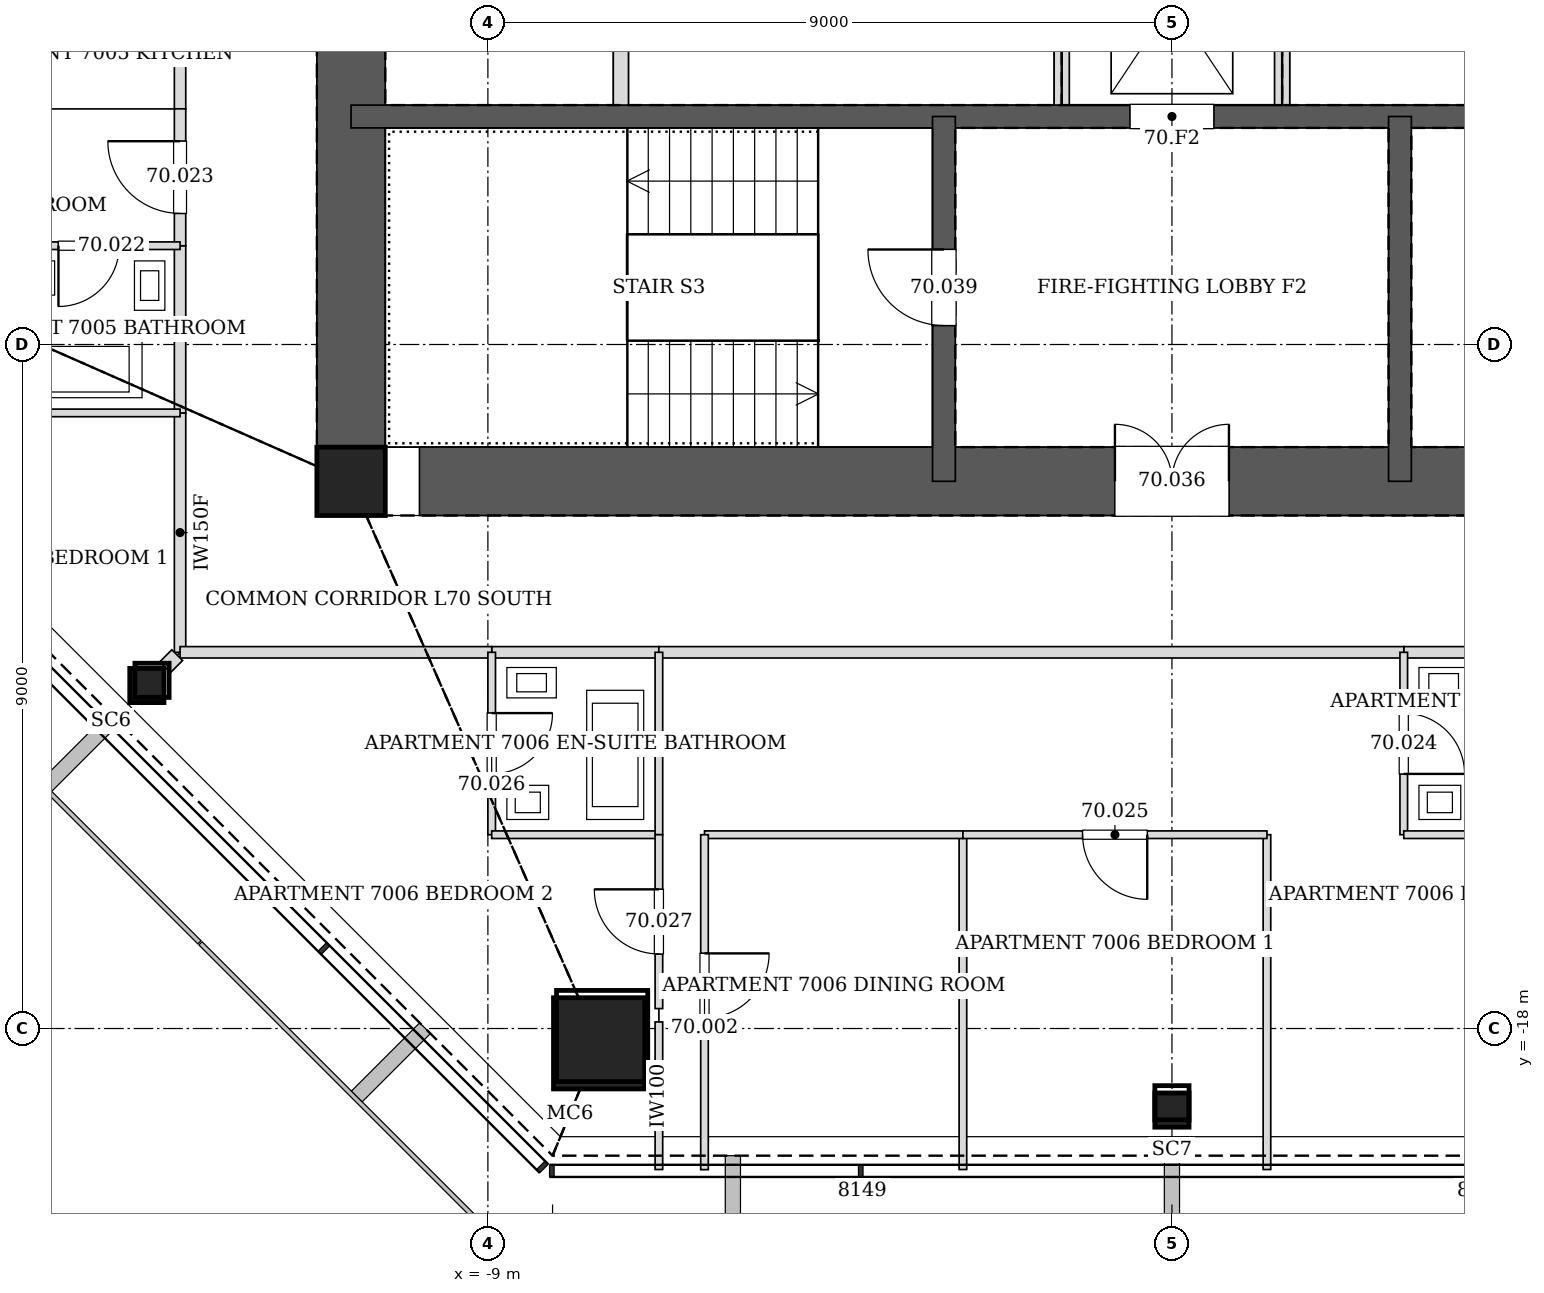
"""IFC4 building model, lengths in metres.
Left out: names, types, materials, properties, quantities, classifications, styles, units other than length and angle.
Written with IfcOpenShell. Run it as: python <this file> out.ifc"""

import sys

from ifc_helpers import new_model, si_unit, direction, frame, frame_2d, origin, origin_2d, place, context, subcontext, project, spatial, rectangle, hollow_rectangle, extrude, element, fill, save


model = new_model("IFC4")
c1 = context("Model", 3, precision=1e-05, world=origin(), true_north=direction((0.0, 1.0)))
c2 = subcontext(c1, "Body", "Model", "MODEL_VIEW")
j1 = project(units=[si_unit("LENGTHUNIT", "METRE"), si_unit("PLANEANGLEUNIT", "RADIAN")], contexts=[c1])
p1 = place(None, origin())
s1 = spatial("IfcSite", under=j1, at=p1, CompositionType="ELEMENT")
p2 = place(p1, origin())
s2 = spatial("IfcBuilding", under=s1, at=p2, CompositionType="ELEMENT")
p3 = place(p2, frame((0.0, 0.0, 287.8)))
s3 = spatial("IfcBuildingStorey", under=s2, at=p3, CompositionType="ELEMENT", Elevation=287.8)
p4 = place(p3, frame((-7.537, -18.195, 0.0), z_axis=(0.01169924247, 0.02827915051, 0.999531598986), x_axis=(-0.924045401938, 0.382282742426, 0.0)))
e1 = element("IfcColumn", 1, at=p4, inside=s3, PredefinedType="COLUMN", context=c2, shape_type="SweptSolid", body=[
    extrude(hollow_rectangle(XDim=1.2, YDim=1.2, WallThickness=0.055, at=origin_2d()), origin(), (0.0, 0.0, 1.0), 3.402),
])
for number, where, z_axis, x_axis in (
    (2, (-13.487, -13.487, 0.0), (0.02, 0.02, 1.0), (-0.707, 0.707, 0.0)),
    (3, (0.0, -19.073, 0.0), (0.0, 0.028, 1.0), (-1.0, 0.0, 0.0)),
):
    element("IfcColumn", number, at=place(p3, frame(where, z_axis=z_axis, x_axis=x_axis)), inside=s3, PredefinedType="COLUMN", context=c2, shape_type="SweptSolid", body=[
        extrude(hollow_rectangle(XDim=0.45, YDim=0.45, WallThickness=0.02, at=origin_2d()), origin(), (0.0, 0.0, 1.0), 3.401),
    ])
p5 = place(p3, frame((-10.8, -10.8, 0.0), z_axis=(0.0, 0.0, 1.0), x_axis=(1.0, 0.0, 0.0)))
e4 = element("IfcColumn", 4, at=p5, inside=s3, PredefinedType="COLUMN", context=c2, shape_type="SweptSolid", body=[
    extrude(hollow_rectangle(XDim=0.9, YDim=0.9, WallThickness=0.04, at=origin_2d()), origin(), (0.0, 0.0, 1.0), 3.4),
])
p6 = place(p3, frame((-10.8, -10.8, 0.0), z_axis=(0.0, 0.0, 1.0), x_axis=(1.0, 0.0, 0.0)))
e5 = element("IfcWall", 5, at=p6, inside=s3, PredefinedType="SOLIDWALL", context=c2, shape_type="SweptSolid", body=[
    extrude(rectangle(XDim=21.6, YDim=0.9, at=frame_2d((10.8, 0.0))), origin(), (0.0, 0.0, 1.0), 3.4),
])
p7 = place(p6, frame((10.05, 0.0, 0.0)))
e6 = element("IfcOpeningElement", 6, at=p7, cuts=e5, PredefinedType="OPENING", context=c2, shape_type="SweptSolid", body=[
    extrude(rectangle(XDim=1.5, YDim=2.1, at=frame_2d((0.75, 1.05))), frame((0.0, 0.46, 0.0), z_axis=(0.0, -1.0, 0.0), x_axis=(1.0, 0.0, 0.0)), (0.0, 0.0, 1.0), 0.92),
])
p8 = place(p6, frame((17.1, 0.0, 0.0)))
e7 = element("IfcOpeningElement", 7, at=p8, cuts=e5, PredefinedType="OPENING", context=c2, shape_type="SweptSolid", body=[
    extrude(rectangle(XDim=0.9, YDim=2.1, at=frame_2d((0.45, 1.05))), frame((0.0, 0.46, 0.0), z_axis=(0.0, -1.0, 0.0), x_axis=(1.0, 0.0, 0.0)), (0.0, 0.0, 1.0), 0.92),
])
p9 = place(p3, frame((-10.8, 10.8, 0.0), z_axis=(0.0, 0.0, 1.0), x_axis=(0.0, -1.0, 0.0)))
e8 = element("IfcWall", 8, at=p9, inside=s3, PredefinedType="SOLIDWALL", context=c2, shape_type="SweptSolid", body=[
    extrude(rectangle(XDim=21.6, YDim=0.9, at=frame_2d((10.8, 0.0))), origin(), (0.0, 0.0, 1.0), 3.4),
])
p10 = place(p9, frame((8.7, 0.0, 0.0)))
e9 = element("IfcOpeningElement", 9, at=p10, cuts=e8, PredefinedType="OPENING", context=c2, shape_type="SweptSolid", body=[
    extrude(rectangle(XDim=1.2, YDim=2.1, at=frame_2d((0.6, 1.05))), frame((0.0, 0.46, 0.0), z_axis=(0.0, -1.0, 0.0), x_axis=(1.0, 0.0, 0.0)), (0.0, 0.0, 1.0), 0.92),
])
p11 = place(p9, frame((11.7, 0.0, 0.0)))
e10 = element("IfcOpeningElement", 10, at=p11, cuts=e8, PredefinedType="OPENING", context=c2, shape_type="SweptSolid", body=[
    extrude(rectangle(XDim=1.2, YDim=2.1, at=frame_2d((0.6, 1.05))), frame((0.0, 0.46, 0.0), z_axis=(0.0, -1.0, 0.0), x_axis=(1.0, 0.0, 0.0)), (0.0, 0.0, 1.0), 0.92),
])
p12 = place(p3, frame((-10.8, -6.0, 0.0), z_axis=(0.0, 0.0, 1.0), x_axis=(1.0, 0.0, 0.0)))
e11 = element("IfcWall", 11, at=p12, inside=s3, PredefinedType="SOLIDWALL", context=c2, shape_type="SweptSolid", body=[
    extrude(rectangle(XDim=21.6, YDim=0.3, at=frame_2d((10.8, 0.0))), origin(), (0.0, 0.0, 1.0), 3.4),
])
p13 = place(p12, frame((10.25, 0.0, 0.0)))
e12 = element("IfcOpeningElement", 12, at=p13, cuts=e11, PredefinedType="OPENING", context=c2, shape_type="SweptSolid", body=[
    extrude(rectangle(XDim=1.1, YDim=2.1, at=frame_2d((0.55, 1.05))), frame((0.0, 0.16, 0.0), z_axis=(0.0, -1.0, 0.0), x_axis=(1.0, 0.0, 0.0)), (0.0, 0.0, 1.0), 0.32),
])
p14 = place(p3, frame((-3.0, -6.0, 0.0), z_axis=(0.0, 0.0, 1.0), x_axis=(0.0, -1.0, 0.0)))
e13 = element("IfcWall", 13, at=p14, inside=s3, PredefinedType="SOLIDWALL", context=c2, shape_type="SweptSolid", body=[
    extrude(rectangle(XDim=4.8, YDim=0.3, at=frame_2d((2.4, 0.0))), origin(), (0.0, 0.0, 1.0), 3.4),
])
p15 = place(p14, frame((1.75, 0.0, 0.0)))
e14 = element("IfcOpeningElement", 14, at=p15, cuts=e13, PredefinedType="OPENING", context=c2, shape_type="SweptSolid", body=[
    extrude(rectangle(XDim=1.0, YDim=2.1, at=frame_2d((0.5, 1.05))), frame((0.0, 0.16, 0.0), z_axis=(0.0, -1.0, 0.0), x_axis=(1.0, 0.0, 0.0)), (0.0, 0.0, 1.0), 0.32),
])
p16 = place(p3, frame((3.0, -6.0, 0.0), z_axis=(0.0, 0.0, 1.0), x_axis=(0.0, -1.0, 0.0)))
e15 = element("IfcWall", 15, at=p16, inside=s3, PredefinedType="SOLIDWALL", context=c2, shape_type="SweptSolid", body=[
    extrude(rectangle(XDim=4.8, YDim=0.3, at=frame_2d((2.4, 0.0))), origin(), (0.0, 0.0, 1.0), 3.4),
])
p17 = place(p3, frame((-13.05, -9.899, 0.0), z_axis=(0.0, 0.0, 1.0), x_axis=(0.0, -1.0, 0.0)))
e16 = element("IfcWall", 16, at=p17, inside=s3, PredefinedType="PARTITIONING", context=c2, shape_type="SweptSolid", body=[
    extrude(rectangle(XDim=3.151, YDim=0.15, at=frame_2d((1.576, 0.0))), origin(), (0.0, 0.0, 1.0), 2.497),
])
p18 = place(p3, frame((-13.05, -7.699, 0.0), z_axis=(0.0, 0.0, 1.0), x_axis=(0.0, -1.0, 0.0)))
e17 = element("IfcWall", 17, at=p18, inside=s3, PredefinedType="PARTITIONING", context=c2, shape_type="SweptSolid", body=[
    extrude(rectangle(XDim=2.202, YDim=0.15, at=frame_2d((1.101, 0.0))), origin(), (0.0, 0.0, 1.0), 2.497),
])
p19 = place(p3, frame((-13.05, -4.449, 0.0), z_axis=(0.0, 0.0, 1.0), x_axis=(0.0, -1.0, 0.0)))
e18 = element("IfcWall", 18, at=p19, inside=s3, PredefinedType="PARTITIONING", context=c2, shape_type="SweptSolid", body=[
    extrude(rectangle(XDim=1.452, YDim=0.15, at=frame_2d((0.726, 0.0))), origin(), (0.0, 0.0, 1.0), 3.2),
])
p20 = place(p3, frame((-13.05, -5.899, 0.0), z_axis=(0.0, 0.0, 1.0), x_axis=(0.0, -1.0, 0.0)))
e19 = element("IfcWall", 19, at=p20, inside=s3, PredefinedType="PARTITIONING", context=c2, shape_type="SweptSolid", body=[
    extrude(rectangle(XDim=1.802, YDim=0.15, at=frame_2d((0.901, 0.0))), origin(), (0.0, 0.0, 1.0), 3.2),
])
p21 = place(p20, frame((0.426, 0.0, 0.0)))
e20 = element("IfcOpeningElement", 20, at=p21, cuts=e19, PredefinedType="OPENING", context=c2, shape_type="SweptSolid", body=[
    extrude(rectangle(XDim=0.95, YDim=2.1, at=frame_2d((0.475, 1.05))), frame((0.0, 0.085, 0.0), z_axis=(0.0, -1.0, 0.0), x_axis=(1.0, 0.0, 0.0)), (0.0, 0.0, 1.0), 0.17),
])
for number, where, z_axis, x_axis in (
    (21, (3.049, -13.05, 0.0), (0.0, 0.0, 1.0), (1.0, 0.0, 0.0)),
    (22, (-8.951, -13.05, 0.0), (0.0, 0.0, 1.0), (1.0, 0.0, 0.0)),
):
    element("IfcWall", number, at=place(p3, frame(where, z_axis=z_axis, x_axis=x_axis)), inside=s3, PredefinedType="PARTITIONING", context=c2, shape_type="SweptSolid", body=[
        extrude(rectangle(XDim=2.202, YDim=0.15, at=frame_2d((1.101, 0.0))), origin(), (0.0, 0.0, 1.0), 3.2),
    ])
p22 = place(p3, frame((-13.05, -13.05, 0.0), z_axis=(0.0, 0.0, 1.0), x_axis=(1.0, 0.0, 0.0)))
e23 = element("IfcWall", 23, at=p22, inside=s3, PredefinedType="PARTITIONING", context=c2, shape_type="SweptSolid", body=[
    extrude(rectangle(XDim=4.101, YDim=0.15, at=frame_2d((2.051, 0.0))), origin(), (0.0, 0.0, 1.0), 2.497),
])
p23 = place(p3, frame((-6.751, -13.05, 0.0), z_axis=(0.0, 0.0, 1.0), x_axis=(1.0, 0.0, 0.0)))
e24 = element("IfcWall", 24, at=p23, inside=s3, PredefinedType="PARTITIONING", context=c2, shape_type="SweptSolid", body=[
    extrude(rectangle(XDim=9.802, YDim=0.15, at=frame_2d((4.901, 0.0))), origin(), (0.0, 0.0, 1.0), 2.349),
])
p24 = place(p3, frame((-2.75, -19.855, 0.0), z_axis=(0.0, 0.0, 1.0), x_axis=(0.0, 1.0, 0.0)))
e25 = element("IfcWall", 25, at=p24, inside=s3, PredefinedType="PARTITIONING", context=c2, shape_type="SweptSolid", body=[
    extrude(rectangle(XDim=4.405, YDim=0.1, at=frame_2d((2.203, 0.0))), origin(), (0.0, 0.0, 1.0), 2.73),
])
p25 = place(p3, frame((-2.75, -15.45, 0.0), z_axis=(0.0, 0.0, 1.0), x_axis=(-1.0, 0.0, 0.0)))
e26 = element("IfcWall", 26, at=p25, inside=s3, PredefinedType="PARTITIONING", context=c2, shape_type="SweptSolid", body=[
    extrude(rectangle(XDim=3.4, YDim=0.1, at=frame_2d((1.7, 0.0))), origin(), (0.0, 0.0, 1.0), 3.2),
])
p26 = place(p3, frame((-6.15, -15.45, 0.0), z_axis=(0.0, 0.0, 1.0), x_axis=(0.0, -1.0, 0.0)))
e27 = element("IfcWall", 27, at=p26, inside=s3, PredefinedType="PARTITIONING", context=c2, shape_type="SweptSolid", body=[
    extrude(rectangle(XDim=4.407, YDim=0.1, at=frame_2d((2.204, 0.0))), origin(), (0.0, 0.0, 1.0), 2.73),
])
p27 = place(p26, frame((1.562, 0.0, 0.0)))
e28 = element("IfcOpeningElement", 28, at=p27, cuts=e27, PredefinedType="OPENING", context=c2, shape_type="SweptSolid", body=[
    extrude(rectangle(XDim=0.85, YDim=2.1, at=frame_2d((0.425, 1.05))), frame((0.0, 0.06, 0.0), z_axis=(0.0, -1.0, 0.0), x_axis=(1.0, 0.0, 0.0)), (0.0, 0.0, 1.0), 0.12),
])
p28 = place(p3, frame((-13.05, -9.9, 0.0), z_axis=(0.0, 0.0, 1.0), x_axis=(-1.0, 0.0, 0.0)))
e29 = element("IfcWall", 29, at=p28, inside=s3, PredefinedType="PARTITIONING", context=c2, shape_type="SweptSolid", body=[
    extrude(rectangle(XDim=2.401, YDim=0.1, at=frame_2d((1.2, 0.0))), origin(), (0.0, 0.0, 1.0), 2.497),
])
p29 = place(p3, frame((-13.246, -13.246, 0.0), z_axis=(0.0, 0.0, 1.0), x_axis=(0.707106781187, 0.707106781187, 0.0)))
e30 = element("IfcWall", 30, at=p29, inside=s3, PredefinedType="PARTITIONING", context=c2, shape_type="SweptSolid", body=[
    extrude(rectangle(XDim=0.224, YDim=0.2, at=frame_2d((0.112, 0.0))), origin(), (0.0, 0.0, 1.0), 2.591),
])
p30 = place(p3, frame((-13.05, -7.7, 0.0), z_axis=(0.0, 0.0, 1.0), x_axis=(-1.0, 0.0, 0.0)))
e31 = element("IfcWall", 31, at=p30, inside=s3, PredefinedType="PARTITIONING", context=c2, shape_type="SweptSolid", body=[
    extrude(rectangle(XDim=2.4, YDim=0.1, at=frame_2d((1.2, 0.0))), origin(), (0.0, 0.0, 1.0), 2.591),
])
p31 = place(p30, frame((0.8, 0.0, 0.0)))
e32 = element("IfcOpeningElement", 32, at=p31, cuts=e31, PredefinedType="OPENING", context=c2, shape_type="SweptSolid", body=[
    extrude(rectangle(XDim=0.8, YDim=2.1, at=frame_2d((0.4, 1.05))), frame((0.0, 0.06, 0.0), z_axis=(0.0, -1.0, 0.0), x_axis=(1.0, 0.0, 0.0)), (0.0, 0.0, 1.0), 0.12),
])
p32 = place(p3, frame((3.05, -13.05, 0.0), z_axis=(0.0, 0.0, 1.0), x_axis=(0.0, -1.0, 0.0)))
e33 = element("IfcWall", 33, at=p32, inside=s3, PredefinedType="PARTITIONING", context=c2, shape_type="SweptSolid", body=[
    extrude(rectangle(XDim=2.4, YDim=0.1, at=frame_2d((1.2, 0.0))), origin(), (0.0, 0.0, 1.0), 2.591),
])
p33 = place(p32, frame((0.8, 0.0, 0.0)))
e34 = element("IfcOpeningElement", 34, at=p33, cuts=e33, PredefinedType="OPENING", context=c2, shape_type="SweptSolid", body=[
    extrude(rectangle(XDim=0.8, YDim=2.1, at=frame_2d((0.4, 1.05))), frame((0.0, 0.06, 0.0), z_axis=(0.0, -1.0, 0.0), x_axis=(1.0, 0.0, 0.0)), (0.0, 0.0, 1.0), 0.12),
])
p34 = place(p3, frame((3.05, -15.45, 0.0), z_axis=(0.0, 0.0, 1.0), x_axis=(1.0, 0.0, 0.0)))
e35 = element("IfcWall", 35, at=p34, inside=s3, PredefinedType="PARTITIONING", context=c2, shape_type="SweptSolid", body=[
    extrude(rectangle(XDim=2.2, YDim=0.1, at=frame_2d((1.1, 0.0))), origin(), (0.0, 0.0, 1.0), 3.2),
])
p35 = place(p3, frame((1.25, -19.855, 0.0), z_axis=(0.0, 0.0, 1.0), x_axis=(0.0, 1.0, 0.0)))
e36 = element("IfcWall", 36, at=p35, inside=s3, PredefinedType="PARTITIONING", context=c2, shape_type="SweptSolid", body=[
    extrude(rectangle(XDim=4.405, YDim=0.1, at=frame_2d((2.203, 0.0))), origin(), (0.0, 0.0, 1.0), 2.73),
])
p36 = place(p3, frame((1.25, -15.45, 0.0), z_axis=(0.0, 0.0, 1.0), x_axis=(-1.0, 0.0, 0.0)))
e37 = element("IfcWall", 37, at=p36, inside=s3, PredefinedType="PARTITIONING", context=c2, shape_type="SweptSolid", body=[
    extrude(rectangle(XDim=4.0, YDim=0.1, at=frame_2d((2.0, 0.0))), origin(), (0.0, 0.0, 1.0), 2.349),
])
p37 = place(p36, frame((1.575, 0.0, 0.0)))
e38 = element("IfcOpeningElement", 38, at=p37, cuts=e37, PredefinedType="OPENING", context=c2, shape_type="SweptSolid", body=[
    extrude(rectangle(XDim=0.85, YDim=2.1, at=frame_2d((0.425, 1.05))), frame((0.0, 0.06, 0.0), z_axis=(0.0, -1.0, 0.0), x_axis=(1.0, 0.0, 0.0)), (0.0, 0.0, 1.0), 0.12),
])
p38 = place(p3, frame((-8.95, -13.05, 0.0), z_axis=(0.0, 0.0, 1.0), x_axis=(0.0, -1.0, 0.0)))
e39 = element("IfcWall", 39, at=p38, inside=s3, PredefinedType="PARTITIONING", context=c2, shape_type="SweptSolid", body=[
    extrude(rectangle(XDim=2.4, YDim=0.1, at=frame_2d((1.2, 0.0))), origin(), (0.0, 0.0, 1.0), 2.497),
])
p39 = place(p38, frame((0.8, 0.0, 0.0)))
e40 = element("IfcOpeningElement", 40, at=p39, cuts=e39, PredefinedType="OPENING", context=c2, shape_type="SweptSolid", body=[
    extrude(rectangle(XDim=0.8, YDim=2.1, at=frame_2d((0.4, 1.05))), frame((0.0, 0.06, 0.0), z_axis=(0.0, -1.0, 0.0), x_axis=(1.0, 0.0, 0.0)), (0.0, 0.0, 1.0), 0.12),
])
p40 = place(p3, frame((-8.95, -15.45, 0.0), z_axis=(0.0, 0.0, 1.0), x_axis=(1.0, 0.0, 0.0)))
e41 = element("IfcWall", 41, at=p40, inside=s3, PredefinedType="PARTITIONING", context=c2, shape_type="SweptSolid", body=[
    extrude(rectangle(XDim=2.2, YDim=0.1, at=frame_2d((1.1, 0.0))), origin(), (0.0, 0.0, 1.0), 2.497),
])
p41 = place(p3, frame((-6.75, -15.45, 0.0), z_axis=(0.0, 0.0, 1.0), x_axis=(0.0, 1.0, 0.0)))
e42 = element("IfcWall", 42, at=p41, inside=s3, PredefinedType="PARTITIONING", context=c2, shape_type="SweptSolid", body=[
    extrude(rectangle(XDim=2.4, YDim=0.1, at=frame_2d((1.2, 0.0))), origin(), (0.0, 0.0, 1.0), 2.591),
])
p42 = place(p3, frame((-6.75, -19.855, 0.0), z_axis=(0.0, 0.0, 1.0), x_axis=(0.0, 1.0, 0.0)))
e43 = element("IfcWall", 43, at=p42, inside=s3, PredefinedType="PARTITIONING", context=c2, shape_type="SweptSolid", body=[
    extrude(rectangle(XDim=1.942, YDim=0.1, at=frame_2d((0.971, 0.0))), origin(), (0.0, 0.0, 1.0), 2.74),
])
p43 = place(p3, frame((-6.75, -17.738, 0.0), z_axis=(0.0, 0.0, 1.0), x_axis=(0.0, 1.0, 0.0)))
e44 = element("IfcWall", 44, at=p43, inside=s3, PredefinedType="PARTITIONING", context=c2, shape_type="SweptSolid", body=[
    extrude(rectangle(XDim=2.288, YDim=0.1, at=frame_2d((1.144, 0.0))), origin(), (0.0, 0.0, 1.0), 2.73),
])
p44 = place(p43, frame((0.719, 0.0, 0.0)))
e45 = element("IfcOpeningElement", 45, at=p44, cuts=e44, PredefinedType="OPENING", context=c2, shape_type="SweptSolid", body=[
    extrude(rectangle(XDim=0.85, YDim=2.1, at=frame_2d((0.425, 1.05))), frame((0.0, 0.06, 0.0), z_axis=(0.0, -1.0, 0.0), x_axis=(1.0, 0.0, 0.0)), (0.0, 0.0, 1.0), 0.12),
])
for number, where, z_axis, x_axis in (
    (46, (-7.25, -5.85, 0.0), (0.0, 0.0, 1.0), (0.0, 1.0, 0.0)),
    (47, (-1.45, -5.85, 0.0), (0.0, 0.0, 1.0), (0.0, 1.0, 0.0)),
    (48, (1.45, -5.85, 0.0), (0.0, 0.0, 1.0), (0.0, 1.0, 0.0)),
):
    element("IfcWall", number, at=place(p3, frame(where, z_axis=z_axis, x_axis=x_axis)), inside=s3, PredefinedType="PARTITIONING", context=c2, shape_type="SweptSolid", body=[
        extrude(rectangle(XDim=2.7, YDim=0.2, at=frame_2d((1.35, 0.0))), origin(), (0.0, 0.0, 1.0), 3.2),
    ])
p45 = place(p27, origin())
e49 = element("IfcDoor", 49, at=p45, inside=s3, OperationType="SINGLE_SWING_LEFT", PredefinedType="DOOR", context=c2, shape_type="SweptSolid", body=[
    extrude(rectangle(XDim=0.85, YDim=2.1, at=frame_2d((0.425, 1.05))), frame((0.0, 0.025, 0.0), z_axis=(0.0, -1.0, 0.0), x_axis=(1.0, 0.0, 0.0)), (0.0, 0.0, 1.0), 0.05),
])
fill(e28, e49)
p46 = place(p31, origin())
e50 = element("IfcDoor", 50, at=p46, inside=s3, OperationType="SINGLE_SWING_RIGHT", PredefinedType="DOOR", context=c2, shape_type="SweptSolid", body=[
    extrude(rectangle(XDim=0.8, YDim=2.1, at=frame_2d((0.4, 1.05))), frame((0.0, 0.025, 0.0), z_axis=(0.0, -1.0, 0.0), x_axis=(1.0, 0.0, 0.0)), (0.0, 0.0, 1.0), 0.05),
])
fill(e32, e50)
p47 = place(p21, frame((0.95, 0.0, 0.0), z_axis=(0.0, 0.0, 1.0), x_axis=(-1.0, 0.0, 0.0)))
e51 = element("IfcDoor", 51, at=p47, inside=s3, OperationType="SINGLE_SWING_RIGHT", PredefinedType="DOOR", context=c2, shape_type="SweptSolid", body=[
    extrude(rectangle(XDim=0.95, YDim=2.1, at=frame_2d((0.475, 1.05))), frame((0.0, 0.025, 0.0), z_axis=(0.0, -1.0, 0.0), x_axis=(1.0, 0.0, 0.0)), (0.0, 0.0, 1.0), 0.05),
])
fill(e20, e51)
p48 = place(p33, origin())
e52 = element("IfcDoor", 52, at=p48, inside=s3, OperationType="SINGLE_SWING_RIGHT", PredefinedType="DOOR", context=c2, shape_type="SweptSolid", body=[
    extrude(rectangle(XDim=0.8, YDim=2.1, at=frame_2d((0.4, 1.05))), frame((0.0, 0.025, 0.0), z_axis=(0.0, -1.0, 0.0), x_axis=(1.0, 0.0, 0.0)), (0.0, 0.0, 1.0), 0.05),
])
fill(e34, e52)
p49 = place(p37, origin())
e53 = element("IfcDoor", 53, at=p49, inside=s3, OperationType="SINGLE_SWING_LEFT", PredefinedType="DOOR", context=c2, shape_type="SweptSolid", body=[
    extrude(rectangle(XDim=0.85, YDim=2.1, at=frame_2d((0.425, 1.05))), frame((0.0, 0.025, 0.0), z_axis=(0.0, -1.0, 0.0), x_axis=(1.0, 0.0, 0.0)), (0.0, 0.0, 1.0), 0.05),
])
fill(e38, e53)
p50 = place(p39, origin())
e54 = element("IfcDoor", 54, at=p50, inside=s3, OperationType="SINGLE_SWING_LEFT", PredefinedType="DOOR", context=c2, shape_type="SweptSolid", body=[
    extrude(rectangle(XDim=0.8, YDim=2.1, at=frame_2d((0.4, 1.05))), frame((0.0, 0.025, 0.0), z_axis=(0.0, -1.0, 0.0), x_axis=(1.0, 0.0, 0.0)), (0.0, 0.0, 1.0), 0.05),
])
fill(e40, e54)
p51 = place(p44, origin())
e55 = element("IfcDoor", 55, at=p51, inside=s3, OperationType="SINGLE_SWING_RIGHT", PredefinedType="DOOR", context=c2, shape_type="SweptSolid", body=[
    extrude(rectangle(XDim=0.85, YDim=2.1, at=frame_2d((0.425, 1.05))), frame((0.0, 0.025, 0.0), z_axis=(0.0, -1.0, 0.0), x_axis=(1.0, 0.0, 0.0)), (0.0, 0.0, 1.0), 0.05),
])
fill(e45, e55)
p52 = place(p7, origin())
e56 = element("IfcDoor", 56, at=p52, inside=s3, OperationType="DOUBLE_DOOR_SINGLE_SWING", PredefinedType="DOOR", context=c2, shape_type="SweptSolid", body=[
    extrude(rectangle(XDim=1.5, YDim=2.1, at=frame_2d((0.75, 1.05))), frame((0.0, 0.025, 0.0), z_axis=(0.0, -1.0, 0.0), x_axis=(1.0, 0.0, 0.0)), (0.0, 0.0, 1.0), 0.05),
])
fill(e6, e56)
p53 = place(p15, frame((1.0, 0.0, 0.0), z_axis=(0.0, 0.0, 1.0), x_axis=(-1.0, 0.0, 0.0)))
e57 = element("IfcDoor", 57, at=p53, inside=s3, OperationType="SINGLE_SWING_RIGHT", PredefinedType="DOOR", context=c2, shape_type="SweptSolid", body=[
    extrude(rectangle(XDim=1.0, YDim=2.1, at=frame_2d((0.5, 1.05))), frame((0.0, 0.025, 0.0), z_axis=(0.0, -1.0, 0.0), x_axis=(1.0, 0.0, 0.0)), (0.0, 0.0, 1.0), 0.05),
])
fill(e14, e57)
p54 = place(p13, origin())
e58 = element("IfcDoor", 58, at=p54, inside=s3, OperationType="DOUBLE_DOOR_SLIDING", PredefinedType="DOOR", context=c2, shape_type="SweptSolid", body=[
    extrude(rectangle(XDim=1.1, YDim=2.1, at=frame_2d((0.55, 1.05))), frame((0.0, 0.025, 0.0), z_axis=(0.0, -1.0, 0.0), x_axis=(1.0, 0.0, 0.0)), (0.0, 0.0, 1.0), 0.05),
])
fill(e12, e58)
save(model, sys.argv[1])
